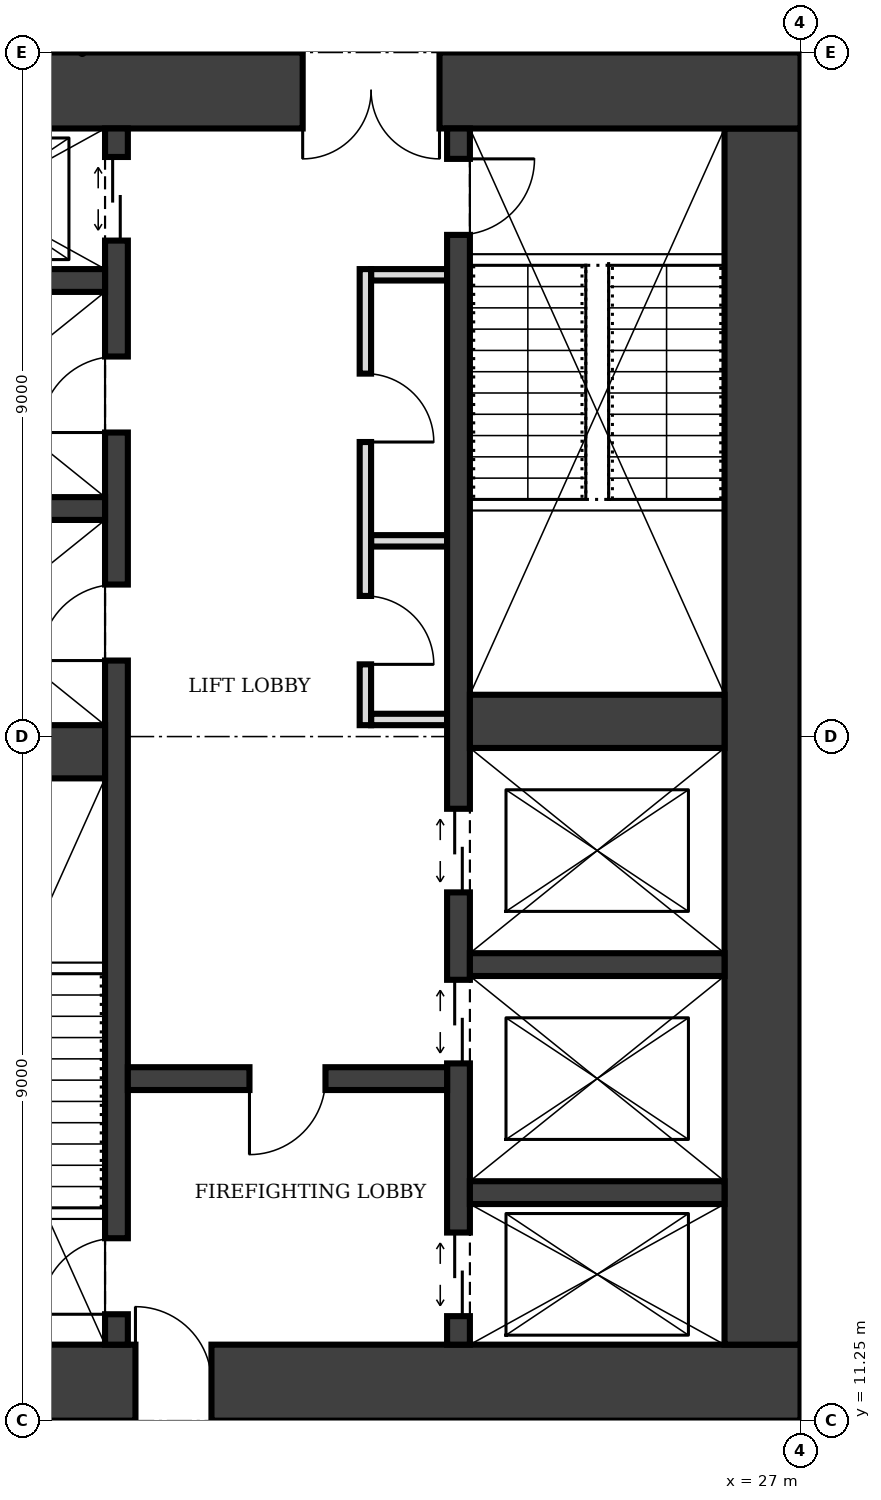
"""IFC4 building model, lengths in metres.
Left out: names, types, materials, properties, quantities, classifications, styles, units other than length and angle.
Written with IfcOpenShell. Run it as: python <this file> out.ifc"""

import sys

from ifc_helpers import new_model, si_unit, direction, frame, frame_2d, origin, place, context, subcontext, project, spatial, rectangle, extrude, element, fill, save


model = new_model("IFC4")
c1 = context("Model", 3, precision=1e-05, world=origin(), true_north=direction((0.0, 1.0)))
c2 = subcontext(c1, "Body", "Model", "MODEL_VIEW")
j1 = project(units=[si_unit("LENGTHUNIT", "METRE"), si_unit("PLANEANGLEUNIT", "RADIAN")], contexts=[c1])
p1 = place(None, origin())
s1 = spatial("IfcSite", under=j1, at=p1, CompositionType="ELEMENT")
p2 = place(p1, origin())
s2 = spatial("IfcBuilding", under=s1, at=p2, CompositionType="ELEMENT")
p3 = place(p2, frame((0.0, 0.0, 197.0)))
s3 = spatial("IfcBuildingStorey", under=s2, at=p3, CompositionType="ELEMENT", Elevation=197.0)
p4 = place(p3, frame((13.5, 11.75, 0.0), z_axis=(0.0, 0.0, 1.0), x_axis=(1.0, 0.0, 0.0)))
e1 = element("IfcWall", 1, at=p4, inside=s3, PredefinedType="SHEAR", context=c2, shape_type="SweptSolid", body=[
    extrude(rectangle(XDim=13.5, YDim=1.0, at=frame_2d((6.75, 0.0))), origin(), (0.0, 0.0, 1.0), 4.0),
])
p5 = place(p4, frame((4.75, 0.0, 0.0)))
e2 = element("IfcOpeningElement", 2, at=p5, cuts=e1, PredefinedType="OPENING", context=c2, shape_type="SweptSolid", body=[
    extrude(rectangle(XDim=1.0, YDim=2.1, at=frame_2d((0.5, 1.05))), frame((0.0, 0.51, 0.0), z_axis=(0.0, -1.0, 0.0), x_axis=(1.0, 0.0, 0.0)), (0.0, 0.0, 1.0), 1.02),
])
p6 = place(p3, frame((26.5, 12.25, 0.0), z_axis=(0.0, 0.0, 1.0), x_axis=(0.0, 1.0, 0.0)))
e3 = element("IfcWall", 3, at=p6, inside=s3, PredefinedType="SHEAR", context=c2, shape_type="SweptSolid", body=[
    extrude(rectangle(XDim=16.0, YDim=1.0, at=frame_2d((8.0, 0.0))), origin(), (0.0, 0.0, 1.0), 4.0),
])
p7 = place(p3, frame((27.0, 28.75, 0.0), z_axis=(0.0, 0.0, 1.0), x_axis=(-1.0, 0.0, 0.0)))
e4 = element("IfcWall", 4, at=p7, inside=s3, PredefinedType="SHEAR", context=c2, shape_type="SweptSolid", body=[
    extrude(rectangle(XDim=13.5, YDim=1.0, at=frame_2d((6.75, 0.0))), origin(), (0.0, 0.0, 1.0), 4.0),
])
p8 = place(p7, frame((4.75, 0.0, 0.0)))
e5 = element("IfcOpeningElement", 5, at=p8, cuts=e4, PredefinedType="OPENING", context=c2, shape_type="SweptSolid", body=[
    extrude(rectangle(XDim=1.8, YDim=2.1, at=frame_2d((0.9, 1.05))), frame((0.0, 0.51, 0.0), z_axis=(0.0, -1.0, 0.0), x_axis=(1.0, 0.0, 0.0)), (0.0, 0.0, 1.0), 1.02),
])
p9 = place(p3, frame((18.0, 12.25, 0.0), z_axis=(0.0, 0.0, 1.0), x_axis=(0.0, 1.0, 0.0)))
e6 = element("IfcWall", 6, at=p9, inside=s3, PredefinedType="SHEAR", context=c2, shape_type="SweptSolid", body=[
    extrude(rectangle(XDim=16.0, YDim=0.3, at=frame_2d((8.0, 0.0))), origin(), (0.0, 0.0, 1.0), 4.0),
])
p10 = place(p9, frame((0.4, 0.0, 0.0)))
e7 = element("IfcOpeningElement", 7, at=p10, cuts=e6, PredefinedType="OPENING", context=c2, shape_type="SweptSolid", body=[
    extrude(rectangle(XDim=1.0, YDim=2.1, at=frame_2d((0.5, 1.05))), frame((0.0, 0.16, 0.0), z_axis=(0.0, -1.0, 0.0), x_axis=(1.0, 0.0, 0.0)), (0.0, 0.0, 1.0), 0.32),
])
p11 = place(p9, frame((14.525, 0.0, 0.0)))
e8 = element("IfcOpeningElement", 8, at=p11, cuts=e6, PredefinedType="OPENING", context=c2, shape_type="SweptSolid", body=[
    extrude(rectangle(XDim=1.1, YDim=2.1, at=frame_2d((0.55, 1.05))), frame((0.0, 0.16, 0.0), z_axis=(0.0, -1.0, 0.0), x_axis=(1.0, 0.0, 0.0)), (0.0, 0.0, 1.0), 0.32),
])
p12 = place(p9, frame((9.0, 0.0, 0.0)))
e9 = element("IfcOpeningElement", 9, at=p12, cuts=e6, PredefinedType="OPENING", context=c2, shape_type="SweptSolid", body=[
    extrude(rectangle(XDim=1.0, YDim=2.1, at=frame_2d((0.5, 1.05))), frame((0.0, 0.16, 0.0), z_axis=(0.0, -1.0, 0.0), x_axis=(1.0, 0.0, 0.0)), (0.0, 0.0, 1.0), 0.32),
])
p13 = place(p9, frame((12.0, 0.0, 0.0)))
e10 = element("IfcOpeningElement", 10, at=p13, cuts=e6, PredefinedType="OPENING", context=c2, shape_type="SweptSolid", body=[
    extrude(rectangle(XDim=1.0, YDim=2.1, at=frame_2d((0.5, 1.05))), frame((0.0, 0.16, 0.0), z_axis=(0.0, -1.0, 0.0), x_axis=(1.0, 0.0, 0.0)), (0.0, 0.0, 1.0), 0.32),
])
p14 = place(p3, frame((22.5, 12.25, 0.0), z_axis=(0.0, 0.0, 1.0), x_axis=(0.0, 1.0, 0.0)))
e11 = element("IfcWall", 11, at=p14, inside=s3, PredefinedType="SHEAR", context=c2, shape_type="SweptSolid", body=[
    extrude(rectangle(XDim=16.0, YDim=0.3, at=frame_2d((8.0, 0.0))), origin(), (0.0, 0.0, 1.0), 4.0),
])
p15 = place(p14, frame((14.6, 0.0, 0.0)))
e12 = element("IfcOpeningElement", 12, at=p15, cuts=e11, PredefinedType="OPENING", context=c2, shape_type="SweptSolid", body=[
    extrude(rectangle(XDim=1.0, YDim=2.1, at=frame_2d((0.5, 1.05))), frame((0.0, 0.16, 0.0), z_axis=(0.0, -1.0, 0.0), x_axis=(1.0, 0.0, 0.0)), (0.0, 0.0, 1.0), 0.32),
])
p16 = place(p14, frame((0.375, 0.0, 0.0)))
e13 = element("IfcOpeningElement", 13, at=p16, cuts=e11, PredefinedType="OPENING", context=c2, shape_type="SweptSolid", body=[
    extrude(rectangle(XDim=1.1, YDim=2.1, at=frame_2d((0.55, 1.05))), frame((0.0, 0.16, 0.0), z_axis=(0.0, -1.0, 0.0), x_axis=(1.0, 0.0, 0.0)), (0.0, 0.0, 1.0), 0.32),
])
p17 = place(p14, frame((3.7, 0.0, 0.0)))
e14 = element("IfcOpeningElement", 14, at=p17, cuts=e11, PredefinedType="OPENING", context=c2, shape_type="SweptSolid", body=[
    extrude(rectangle(XDim=1.1, YDim=2.1, at=frame_2d((0.55, 1.05))), frame((0.0, 0.16, 0.0), z_axis=(0.0, -1.0, 0.0), x_axis=(1.0, 0.0, 0.0)), (0.0, 0.0, 1.0), 0.32),
])
p18 = place(p14, frame((5.95, 0.0, 0.0)))
e15 = element("IfcOpeningElement", 15, at=p18, cuts=e11, PredefinedType="OPENING", context=c2, shape_type="SweptSolid", body=[
    extrude(rectangle(XDim=1.1, YDim=2.1, at=frame_2d((0.55, 1.05))), frame((0.0, 0.16, 0.0), z_axis=(0.0, -1.0, 0.0), x_axis=(1.0, 0.0, 0.0)), (0.0, 0.0, 1.0), 0.32),
])
p19 = place(p3, frame((14.5, 20.05, 0.0), z_axis=(0.0, 0.0, 1.0), x_axis=(1.0, 0.0, 0.0)))
e16 = element("IfcWall", 16, at=p19, inside=s3, PredefinedType="SHEAR", context=c2, shape_type="SweptSolid", body=[
    extrude(rectangle(XDim=3.35, YDim=0.7, at=frame_2d((1.675, 0.0))), origin(), (0.0, 0.0, 1.0), 4.0),
])
p20 = place(p3, frame((18.15, 15.75, 0.0), z_axis=(0.0, 0.0, 1.0), x_axis=(1.0, 0.0, 0.0)))
e17 = element("IfcWall", 17, at=p20, inside=s3, PredefinedType="SHEAR", context=c2, shape_type="SweptSolid", body=[
    extrude(rectangle(XDim=4.2, YDim=0.3, at=frame_2d((2.1, 0.0))), origin(), (0.0, 0.0, 1.0), 4.0),
])
p21 = place(p20, frame((1.6, 0.0, 0.0)))
e18 = element("IfcOpeningElement", 18, at=p21, cuts=e17, PredefinedType="OPENING", context=c2, shape_type="SweptSolid", body=[
    extrude(rectangle(XDim=1.0, YDim=2.1, at=frame_2d((0.5, 1.05))), frame((0.0, 0.16, 0.0), z_axis=(0.0, -1.0, 0.0), x_axis=(1.0, 0.0, 0.0)), (0.0, 0.0, 1.0), 0.32),
])
for number, where, z_axis, x_axis in (
    (19, (22.65, 14.25, 0.0), (0.0, 0.0, 1.0), (1.0, 0.0, 0.0)),
    (20, (22.65, 17.25, 0.0), (0.0, 0.0, 1.0), (1.0, 0.0, 0.0)),
):
    element("IfcWall", number, at=place(p3, frame(where, z_axis=z_axis, x_axis=x_axis)), inside=s3, PredefinedType="SHEAR", context=c2, shape_type="SweptSolid", body=[
        extrude(rectangle(XDim=3.35, YDim=0.3, at=frame_2d((1.675, 0.0))), origin(), (0.0, 0.0, 1.0), 4.0),
    ])
p22 = place(p3, frame((22.65, 20.45, 0.0), z_axis=(0.0, 0.0, 1.0), x_axis=(1.0, 0.0, 0.0)))
e21 = element("IfcWall", 21, at=p22, inside=s3, PredefinedType="SHEAR", context=c2, shape_type="SweptSolid", body=[
    extrude(rectangle(XDim=3.35, YDim=0.7, at=frame_2d((1.675, 0.0))), origin(), (0.0, 0.0, 1.0), 4.0),
])
for number, where, z_axis, x_axis in (
    (22, (14.5, 23.25, 0.0), (0.0, 0.0, 1.0), (1.0, 0.0, 0.0)),
    (23, (14.5, 26.25, 0.0), (0.0, 0.0, 1.0), (1.0, 0.0, 0.0)),
):
    element("IfcWall", number, at=place(p3, frame(where, z_axis=z_axis, x_axis=x_axis)), inside=s3, PredefinedType="SHEAR", context=c2, shape_type="SweptSolid", body=[
        extrude(rectangle(XDim=3.35, YDim=0.3, at=frame_2d((1.675, 0.0))), origin(), (0.0, 0.0, 1.0), 4.0),
    ])
p23 = place(p3, frame((21.275, 20.4, 0.0), z_axis=(0.0, 0.0, 1.0), x_axis=(0.0, 1.0, 0.0)))
e24 = element("IfcWall", 24, at=p23, inside=s3, PredefinedType="PARTITIONING", context=c2, shape_type="SweptSolid", body=[
    extrude(rectangle(XDim=6.0, YDim=0.15, at=frame_2d((3.0, 0.0))), origin(), (0.0, 0.0, 1.0), 3.75),
])
p24 = place(p23, frame((0.8, 0.0, 0.0)))
e25 = element("IfcOpeningElement", 25, at=p24, cuts=e24, PredefinedType="OPENING", context=c2, shape_type="SweptSolid", body=[
    extrude(rectangle(XDim=0.9, YDim=2.1, at=frame_2d((0.45, 1.05))), frame((0.0, 0.085, 0.0), z_axis=(0.0, -1.0, 0.0), x_axis=(1.0, 0.0, 0.0)), (0.0, 0.0, 1.0), 0.17),
])
p25 = place(p23, frame((3.725, 0.0, 0.0)))
e26 = element("IfcOpeningElement", 26, at=p25, cuts=e24, PredefinedType="OPENING", context=c2, shape_type="SweptSolid", body=[
    extrude(rectangle(XDim=0.9, YDim=2.1, at=frame_2d((0.45, 1.05))), frame((0.0, 0.085, 0.0), z_axis=(0.0, -1.0, 0.0), x_axis=(1.0, 0.0, 0.0)), (0.0, 0.0, 1.0), 0.17),
])
for number, where, z_axis, x_axis in (
    (27, (21.35, 20.475, 0.0), (0.0, 0.0, 1.0), (1.0, 0.0, 0.0)),
    (28, (21.35, 22.825, 0.0), (0.0, 0.0, 1.0), (1.0, 0.0, 0.0)),
    (29, (21.35, 26.325, 0.0), (0.0, 0.0, 1.0), (1.0, 0.0, 0.0)),
):
    element("IfcWall", number, at=place(p3, frame(where, z_axis=z_axis, x_axis=x_axis)), inside=s3, PredefinedType="PARTITIONING", context=c2, shape_type="SweptSolid", body=[
        extrude(rectangle(XDim=1.0, YDim=0.15, at=frame_2d((0.5, 0.0))), origin(), (0.0, 0.0, 1.0), 3.75),
    ])
p26 = place(p5, origin())
e30 = element("IfcDoor", 30, at=p26, inside=s3, OperationType="SINGLE_SWING_LEFT", PredefinedType="DOOR", context=c2, shape_type="SweptSolid", body=[
    extrude(rectangle(XDim=1.0, YDim=2.1, at=frame_2d((0.5, 1.05))), frame((0.0, 0.025, 0.0), z_axis=(0.0, -1.0, 0.0), x_axis=(1.0, 0.0, 0.0)), (0.0, 0.0, 1.0), 0.05),
])
fill(e2, e30)
p27 = place(p8, origin())
e31 = element("IfcDoor", 31, at=p27, inside=s3, OperationType="DOUBLE_DOOR_SINGLE_SWING", PredefinedType="DOOR", context=c2, shape_type="SweptSolid", body=[
    extrude(rectangle(XDim=1.8, YDim=2.1, at=frame_2d((0.9, 1.05))), frame((0.0, 0.025, 0.0), z_axis=(0.0, -1.0, 0.0), x_axis=(1.0, 0.0, 0.0)), (0.0, 0.0, 1.0), 0.05),
])
fill(e5, e31)
p28 = place(p21, frame((1.0, 0.0, 0.0), z_axis=(0.0, 0.0, 1.0), x_axis=(-1.0, 0.0, 0.0)))
e32 = element("IfcDoor", 32, at=p28, inside=s3, OperationType="SINGLE_SWING_RIGHT", PredefinedType="DOOR", context=c2, shape_type="SweptSolid", body=[
    extrude(rectangle(XDim=1.0, YDim=2.1, at=frame_2d((0.5, 1.05))), frame((0.0, 0.025, 0.0), z_axis=(0.0, -1.0, 0.0), x_axis=(1.0, 0.0, 0.0)), (0.0, 0.0, 1.0), 0.05),
])
fill(e18, e32)
p29 = place(p10, origin())
e33 = element("IfcDoor", 33, at=p29, inside=s3, OperationType="SINGLE_SWING_LEFT", PredefinedType="DOOR", context=c2, shape_type="SweptSolid", body=[
    extrude(rectangle(XDim=1.0, YDim=2.1, at=frame_2d((0.5, 1.05))), frame((0.0, 0.025, 0.0), z_axis=(0.0, -1.0, 0.0), x_axis=(1.0, 0.0, 0.0)), (0.0, 0.0, 1.0), 0.05),
])
fill(e7, e33)
p30 = place(p15, frame((1.0, 0.0, 0.0), z_axis=(0.0, 0.0, 1.0), x_axis=(-1.0, 0.0, 0.0)))
e34 = element("IfcDoor", 34, at=p30, inside=s3, OperationType="SINGLE_SWING_LEFT", PredefinedType="DOOR", context=c2, shape_type="SweptSolid", body=[
    extrude(rectangle(XDim=1.0, YDim=2.1, at=frame_2d((0.5, 1.05))), frame((0.0, 0.025, 0.0), z_axis=(0.0, -1.0, 0.0), x_axis=(1.0, 0.0, 0.0)), (0.0, 0.0, 1.0), 0.05),
])
fill(e12, e34)
p31 = place(p16, origin())
e35 = element("IfcDoor", 35, at=p31, inside=s3, OperationType="DOUBLE_DOOR_SLIDING", PredefinedType="DOOR", context=c2, shape_type="SweptSolid", body=[
    extrude(rectangle(XDim=1.1, YDim=2.1, at=frame_2d((0.55, 1.05))), frame((0.0, 0.025, 0.0), z_axis=(0.0, -1.0, 0.0), x_axis=(1.0, 0.0, 0.0)), (0.0, 0.0, 1.0), 0.05),
])
fill(e13, e35)
p32 = place(p11, origin())
e36 = element("IfcDoor", 36, at=p32, inside=s3, OperationType="DOUBLE_DOOR_SLIDING", PredefinedType="DOOR", context=c2, shape_type="SweptSolid", body=[
    extrude(rectangle(XDim=1.1, YDim=2.1, at=frame_2d((0.55, 1.05))), frame((0.0, 0.025, 0.0), z_axis=(0.0, -1.0, 0.0), x_axis=(1.0, 0.0, 0.0)), (0.0, 0.0, 1.0), 0.05),
])
fill(e8, e36)
p33 = place(p17, origin())
e37 = element("IfcDoor", 37, at=p33, inside=s3, OperationType="DOUBLE_DOOR_SLIDING", PredefinedType="DOOR", context=c2, shape_type="SweptSolid", body=[
    extrude(rectangle(XDim=1.1, YDim=2.1, at=frame_2d((0.55, 1.05))), frame((0.0, 0.025, 0.0), z_axis=(0.0, -1.0, 0.0), x_axis=(1.0, 0.0, 0.0)), (0.0, 0.0, 1.0), 0.05),
])
fill(e14, e37)
p34 = place(p18, origin())
e38 = element("IfcDoor", 38, at=p34, inside=s3, OperationType="DOUBLE_DOOR_SLIDING", PredefinedType="DOOR", context=c2, shape_type="SweptSolid", body=[
    extrude(rectangle(XDim=1.1, YDim=2.1, at=frame_2d((0.55, 1.05))), frame((0.0, 0.025, 0.0), z_axis=(0.0, -1.0, 0.0), x_axis=(1.0, 0.0, 0.0)), (0.0, 0.0, 1.0), 0.05),
])
fill(e15, e38)
p35 = place(p24, frame((0.9, 0.0, 0.0), z_axis=(0.0, 0.0, 1.0), x_axis=(-1.0, 0.0, 0.0)))
e39 = element("IfcDoor", 39, at=p35, inside=s3, OperationType="SINGLE_SWING_RIGHT", PredefinedType="DOOR", context=c2, shape_type="SweptSolid", body=[
    extrude(rectangle(XDim=0.9, YDim=2.1, at=frame_2d((0.45, 1.05))), frame((0.0, 0.025, 0.0), z_axis=(0.0, -1.0, 0.0), x_axis=(1.0, 0.0, 0.0)), (0.0, 0.0, 1.0), 0.05),
])
fill(e25, e39)
p36 = place(p25, frame((0.9, 0.0, 0.0), z_axis=(0.0, 0.0, 1.0), x_axis=(-1.0, 0.0, 0.0)))
e40 = element("IfcDoor", 40, at=p36, inside=s3, OperationType="SINGLE_SWING_RIGHT", PredefinedType="DOOR", context=c2, shape_type="SweptSolid", body=[
    extrude(rectangle(XDim=0.9, YDim=2.1, at=frame_2d((0.45, 1.05))), frame((0.0, 0.025, 0.0), z_axis=(0.0, -1.0, 0.0), x_axis=(1.0, 0.0, 0.0)), (0.0, 0.0, 1.0), 0.05),
])
fill(e26, e40)
p37 = place(p12, origin())
e41 = element("IfcDoor", 41, at=p37, inside=s3, OperationType="SINGLE_SWING_LEFT", PredefinedType="DOOR", context=c2, shape_type="SweptSolid", body=[
    extrude(rectangle(XDim=1.0, YDim=2.1, at=frame_2d((0.5, 1.05))), frame((0.0, 0.025, 0.0), z_axis=(0.0, -1.0, 0.0), x_axis=(1.0, 0.0, 0.0)), (0.0, 0.0, 1.0), 0.05),
])
fill(e9, e41)
p38 = place(p13, origin())
e42 = element("IfcDoor", 42, at=p38, inside=s3, OperationType="SINGLE_SWING_LEFT", PredefinedType="DOOR", context=c2, shape_type="SweptSolid", body=[
    extrude(rectangle(XDim=1.0, YDim=2.1, at=frame_2d((0.5, 1.05))), frame((0.0, 0.025, 0.0), z_axis=(0.0, -1.0, 0.0), x_axis=(1.0, 0.0, 0.0)), (0.0, 0.0, 1.0), 0.05),
])
fill(e10, e42)
save(model, sys.argv[1])
